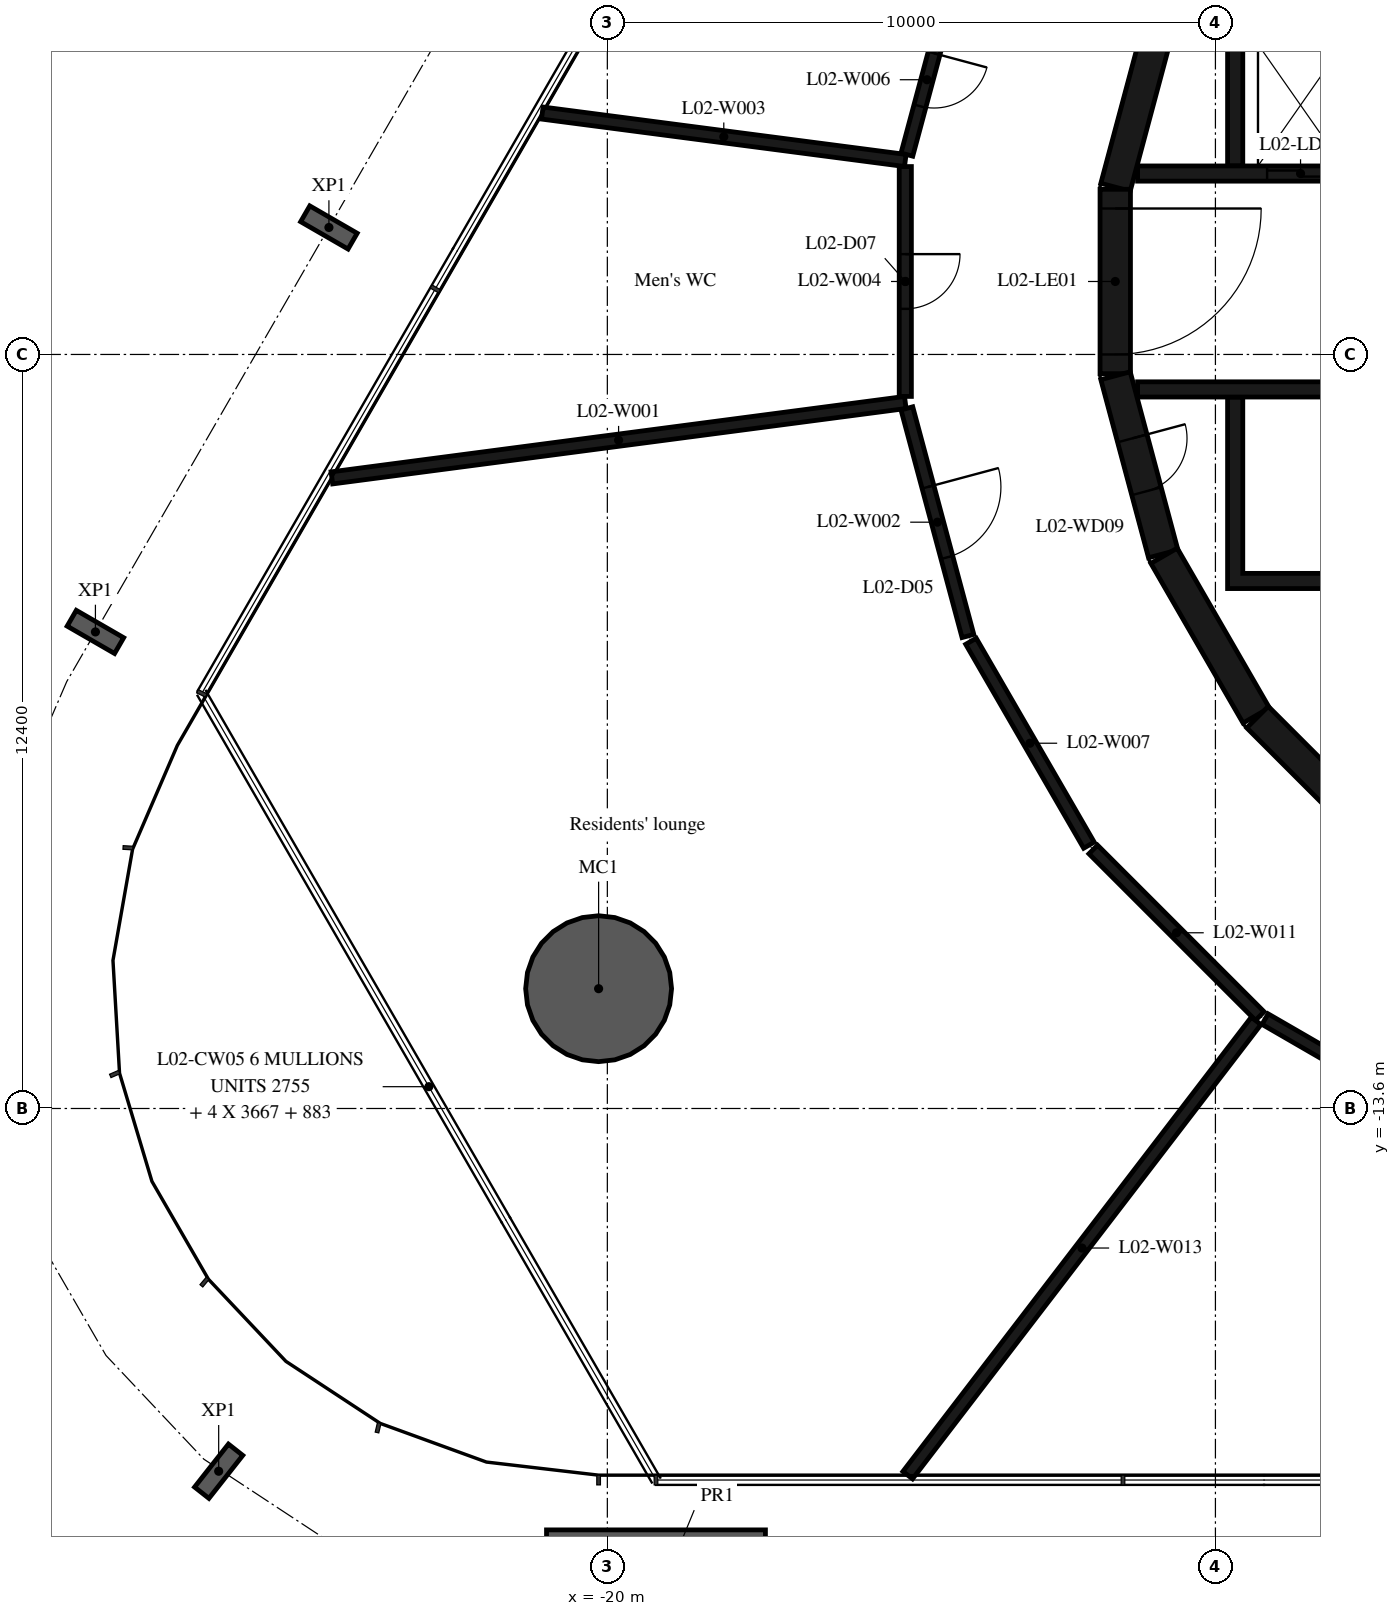
"""IFC4 building model, lengths in metres.
Left out: names, types, materials, properties, quantities, classifications, styles, units other than length and angle.
Written with IfcOpenShell. Run it as: python <this file> out.ifc"""

import sys

from ifc_helpers import new_model, si_unit, direction, frame, frame_2d, origin, origin_2d, place, context, subcontext, project, spatial, polyline, rectangle, hollow_circle, i_section, outline, extrude, element, fill, save


model = new_model("IFC4")
c1 = context("Model", 3, precision=1e-05, world=origin(), true_north=direction((0.0, 1.0)))
c2 = subcontext(c1, "Body", "Model", "MODEL_VIEW")
j1 = project(units=[si_unit("LENGTHUNIT", "METRE"), si_unit("PLANEANGLEUNIT", "RADIAN")], contexts=[c1])
p1 = place(None, origin())
s1 = spatial("IfcSite", under=j1, at=p1, CompositionType="ELEMENT")
p2 = place(p1, origin())
s2 = spatial("IfcBuilding", under=s1, at=p2, CompositionType="ELEMENT")
p3 = place(p2, frame((0.0, 0.0, 13.8)))
s3 = spatial("IfcBuildingStorey", under=s2, at=p3, CompositionType="ELEMENT", Elevation=13.8)
p4 = place(p3, frame((-20.144, -11.63, -0.38), z_axis=(0.0, 0.0, 1.0), x_axis=(1.0, 0.0, 0.0)))
e1 = element("IfcColumn", 1, at=p4, inside=s3, PredefinedType="COLUMN", context=c2, shape_type="SweptSolid", body=[
    extrude(hollow_circle(Radius=1.2, WallThickness=0.06, at=origin_2d()), origin(), (0.0, 0.0, 1.0), 4.8),
])
for number, where, z_axis, x_axis in (
    (2, (-24.579, 0.888, -0.38), (0.0, 0.0, 1.0), (0.5, 0.866, 0.0)),
    (3, (-28.419, -5.763, -0.38), (0.0, 0.0, 1.0), (0.5, 0.866, 0.0)),
    (4, (-26.392, -19.565, -0.38), (0.0, 0.0, 1.0), (-0.786, 0.619, 0.0)),
):
    element("IfcColumn", number, at=place(p3, frame(where, z_axis=z_axis, x_axis=x_axis)), inside=s3, PredefinedType="COLUMN", context=c2, shape_type="SweptSolid", body=[
        extrude(i_section(OverallWidth=0.3, OverallDepth=0.9, WebThickness=0.019, FlangeThickness=0.035, FilletRadius=0.03, at=origin_2d()), origin(), (0.0, 0.0, 1.0), 4.8),
    ])
p5 = place(p3, frame((-19.2, -21.73, -0.38), z_axis=(0.0, 0.0, 1.0), x_axis=(1.0, 0.0, 0.0)))
e5 = element("IfcColumn", 5, at=p5, inside=s3, PredefinedType="COLUMN", context=c2, shape_type="SweptSolid", body=[
    extrude(rectangle(XDim=3.6, YDim=2.4, at=origin_2d()), origin(), (0.0, 0.0, 1.0), 4.8),
])
p6 = place(p3, frame((-10.858, 4.479, 0.0), z_axis=(0.0, 0.0, 1.0), x_axis=(-0.258734743916, -0.965948410781, 0.0)))
e6 = element("IfcWall", 6, at=p6, inside=s3, PredefinedType="SHEAR", context=c2, shape_type="SweptSolid", body=[
    extrude(rectangle(XDim=3.033, YDim=0.5, at=frame_2d((1.516, 0.0))), origin(), (0.0, 0.0, 1.0), 4.42),
])
p7 = place(p3, frame((-11.647, 1.516, 0.0), z_axis=(0.0, 0.0, 1.0), x_axis=(0.0, -1.0, 0.0)))
e7 = element("IfcWall", 7, at=p7, inside=s3, PredefinedType="SHEAR", context=c2, shape_type="SweptSolid", body=[
    extrude(rectangle(XDim=3.033, YDim=0.5, at=frame_2d((1.516, 0.0))), origin(), (0.0, 0.0, 1.0), 4.42),
])
p8 = place(p7, frame((0.316, 0.0, 0.0)))
e8 = element("IfcOpeningElement", 8, at=p8, cuts=e7, PredefinedType="OPENING", context=c2, shape_type="SweptSolid", body=[
    extrude(rectangle(XDim=2.4, YDim=2.1, at=frame_2d((1.2, 1.05))), frame((0.0, 0.26, 0.0), z_axis=(0.0, -1.0, 0.0), x_axis=(1.0, 0.0, 0.0)), (0.0, 0.0, 1.0), 0.52),
])
p9 = place(p3, frame((-11.643, -1.55, 0.0), z_axis=(0.0, 0.0, 1.0), x_axis=(0.258734743916, -0.965948410781, 0.0)))
e9 = element("IfcWall", 9, at=p9, inside=s3, PredefinedType="SHEAR", context=c2, shape_type="SweptSolid", body=[
    extrude(rectangle(XDim=3.033, YDim=0.5, at=frame_2d((1.516, 0.0))), origin(), (0.0, 0.0, 1.0), 4.42),
])
p10 = place(p9, frame((1.066, 0.0, 0.0)))
e10 = element("IfcOpeningElement", 10, at=p10, cuts=e9, PredefinedType="OPENING", context=c2, shape_type="SweptSolid", body=[
    extrude(rectangle(XDim=0.9, YDim=2.1, at=frame_2d((0.45, 1.05))), frame((0.0, 0.26, 0.0), z_axis=(0.0, -1.0, 0.0), x_axis=(1.0, 0.0, 0.0)), (0.0, 0.0, 1.0), 0.52),
])
p11 = place(p3, frame((-10.845, -4.51, 0.0), z_axis=(0.0, 0.0, 1.0), x_axis=(0.500087131594, -0.865975092491, 0.0)))
e11 = element("IfcWall", 11, at=p11, inside=s3, PredefinedType="SHEAR", context=c2, shape_type="SweptSolid", body=[
    extrude(rectangle(XDim=3.033, YDim=0.5, at=frame_2d((1.516, 0.0))), origin(), (0.0, 0.0, 1.0), 4.42),
])
p12 = place(p3, frame((-9.308, -7.164, 0.0), z_axis=(0.0, 0.0, 1.0), x_axis=(0.707106781187, -0.707106781187, 0.0)))
e12 = element("IfcWall", 12, at=p12, inside=s3, PredefinedType="SHEAR", context=c2, shape_type="SweptSolid", body=[
    extrude(rectangle(XDim=3.032, YDim=0.5, at=frame_2d((1.516, 0.0))), origin(), (0.0, 0.0, 1.0), 4.42),
])
p13 = place(p3, origin())
e13 = element("IfcWall", 13, at=p13, inside=s3, PredefinedType="SHEAR", context=c2, shape_type="SweptSolid", body=[
    extrude(outline(polyline([(-9.55, 4.8), (-7.65, 4.8), (-7.65, 1.9), (-7.4, 1.9), (-7.4, 4.8), (-5.5, 4.8), (-5.5, 1.9), (-5.25, 1.9), (-5.25, 4.8), (-3.35, 4.8), (-3.35, 1.9), (-3.1, 1.9), (-3.1, 4.8), (-1.2, 4.8), (-1.2, 1.9), (-0.95, 1.9), (-0.95, 4.8), (0.95, 4.8), (0.95, 1.9), (1.2, 1.9), (1.2, 4.8), (3.1, 4.8), (3.1, 1.9), (3.35, 1.9), (3.35, 4.8), (5.25, 4.8), (5.25, 1.9), (5.5, 1.9), (5.5, 4.8), (7.4, 4.8), (7.4, 1.9), (7.65, 1.9), (7.65, 4.8), (9.55, 4.8), (9.55, 1.9), (9.8, 1.9), (9.8, 4.8), (9.8, 5.05), (-9.8, 5.05), (-9.8, 4.8), (-9.8, 1.9), (-9.55, 1.9), (-9.55, 4.8)])), origin(), (0.0, 0.0, 1.0), 4.42),
])
p14 = place(p3, origin())
e14 = element("IfcWall", 14, at=p14, inside=s3, PredefinedType="SHEAR", context=c2, shape_type="SweptSolid", body=[
    extrude(outline(polyline([(9.8, -5.05), (9.8, -4.8), (9.8, -1.9), (9.55, -1.9), (9.55, -4.8), (7.65, -4.8), (7.65, -1.9), (7.4, -1.9), (7.4, -4.8), (5.5, -4.8), (5.5, -1.9), (5.25, -1.9), (5.25, -4.8), (3.35, -4.8), (3.35, -1.9), (3.1, -1.9), (3.1, -4.8), (-5.25, -4.8), (-5.25, -1.9), (-5.5, -1.9), (-5.5, -4.8), (-7.4, -4.8), (-7.4, -1.9), (-7.65, -1.9), (-7.65, -4.8), (-9.55, -4.8), (-9.55, -1.9), (-9.8, -1.9), (-9.8, -4.8), (-9.8, -5.05), (9.8, -5.05)])), origin(), (0.0, 0.0, 1.0), 4.42),
])
p15 = place(p3, frame((-11.28, 1.775, 0.0), z_axis=(0.0, 0.0, 1.0), x_axis=(1.0, 0.0, 0.0)))
e15 = element("IfcWall", 15, at=p15, inside=s3, PredefinedType="SHEAR", context=c2, shape_type="SweptSolid", body=[
    extrude(rectangle(XDim=14.38, YDim=0.25, at=frame_2d((7.19, 0.0))), origin(), (0.0, 0.0, 1.0), 4.42),
])
p16 = place(p15, frame((2.13, 0.0, 0.0)))
e16 = element("IfcOpeningElement", 16, at=p16, cuts=e15, PredefinedType="OPENING", context=c2, shape_type="SweptSolid", body=[
    extrude(rectangle(XDim=1.1, YDim=2.1, at=frame_2d((0.55, 1.05))), frame((0.0, 0.135, 0.0), z_axis=(0.0, -1.0, 0.0), x_axis=(1.0, 0.0, 0.0)), (0.0, 0.0, 1.0), 0.27),
])
p17 = place(p15, frame((4.28, 0.0, 0.0)))
e17 = element("IfcOpeningElement", 17, at=p17, cuts=e15, PredefinedType="OPENING", context=c2, shape_type="SweptSolid", body=[
    extrude(rectangle(XDim=1.1, YDim=2.1, at=frame_2d((0.55, 1.05))), frame((0.0, 0.135, 0.0), z_axis=(0.0, -1.0, 0.0), x_axis=(1.0, 0.0, 0.0)), (0.0, 0.0, 1.0), 0.27),
])
p18 = place(p15, frame((6.43, 0.0, 0.0)))
e18 = element("IfcOpeningElement", 18, at=p18, cuts=e15, PredefinedType="OPENING", context=c2, shape_type="SweptSolid", body=[
    extrude(rectangle(XDim=1.1, YDim=2.1, at=frame_2d((0.55, 1.05))), frame((0.0, 0.135, 0.0), z_axis=(0.0, -1.0, 0.0), x_axis=(1.0, 0.0, 0.0)), (0.0, 0.0, 1.0), 0.27),
])
p19 = place(p15, frame((8.58, 0.0, 0.0)))
e19 = element("IfcOpeningElement", 19, at=p19, cuts=e15, PredefinedType="OPENING", context=c2, shape_type="SweptSolid", body=[
    extrude(rectangle(XDim=1.1, YDim=2.1, at=frame_2d((0.55, 1.05))), frame((0.0, 0.135, 0.0), z_axis=(0.0, -1.0, 0.0), x_axis=(1.0, 0.0, 0.0)), (0.0, 0.0, 1.0), 0.27),
])
p20 = place(p15, frame((10.83, 0.0, 0.0)))
e20 = element("IfcOpeningElement", 20, at=p20, cuts=e15, PredefinedType="OPENING", context=c2, shape_type="SweptSolid", body=[
    extrude(rectangle(XDim=0.9, YDim=2.1, at=frame_2d((0.45, 1.05))), frame((0.0, 0.135, 0.0), z_axis=(0.0, -1.0, 0.0), x_axis=(1.0, 0.0, 0.0)), (0.0, 0.0, 1.0), 0.27),
])
p21 = place(p15, frame((12.98, 0.0, 0.0)))
e21 = element("IfcOpeningElement", 21, at=p21, cuts=e15, PredefinedType="OPENING", context=c2, shape_type="SweptSolid", body=[
    extrude(rectangle(XDim=0.9, YDim=2.1, at=frame_2d((0.45, 1.05))), frame((0.0, 0.135, 0.0), z_axis=(0.0, -1.0, 0.0), x_axis=(1.0, 0.0, 0.0)), (0.0, 0.0, 1.0), 0.27),
])
p22 = place(p3, frame((-11.28, -1.775, 0.0), z_axis=(0.0, 0.0, 1.0), x_axis=(1.0, 0.0, 0.0)))
e22 = element("IfcWall", 22, at=p22, inside=s3, PredefinedType="SHEAR", context=c2, shape_type="SweptSolid", body=[
    extrude(rectangle(XDim=14.38, YDim=0.25, at=frame_2d((7.19, 0.0))), origin(), (0.0, 0.0, 1.0), 4.42),
])
p23 = place(p22, frame((9.755, 0.0, 0.0)))
e23 = element("IfcOpeningElement", 23, at=p23, cuts=e22, PredefinedType="OPENING", context=c2, shape_type="SweptSolid", body=[
    extrude(rectangle(XDim=0.9, YDim=2.1, at=frame_2d((0.45, 1.05))), frame((0.0, 0.135, 0.0), z_axis=(0.0, -1.0, 0.0), x_axis=(1.0, 0.0, 0.0)), (0.0, 0.0, 1.0), 0.27),
])
p24 = place(p3, frame((-15.1, -1.99, 0.0), z_axis=(0.0, 0.0, 1.0), x_axis=(-0.99146503856, -0.130372839634, 0.0)))
e24 = element("IfcWall", 24, at=p24, inside=s3, PredefinedType="PARTITIONING", context=c2, shape_type="SweptSolid", body=[
    extrude(rectangle(XDim=9.511, YDim=0.2, at=frame_2d((4.756, 0.0))), origin(), (0.0, 0.0, 1.0), 4.42),
])
p25 = place(p3, frame((-15.074, -2.087, 0.0), z_axis=(0.0, 0.0, 1.0), x_axis=(0.259026804199, -0.965870133458, 0.0)))
e25 = element("IfcWall", 25, at=p25, inside=s3, PredefinedType="PARTITIONING", context=c2, shape_type="SweptSolid", body=[
    extrude(rectangle(XDim=3.876, YDim=0.2, at=frame_2d((1.938, 0.0))), origin(), (0.0, 0.0, 1.0), 4.42),
])
p26 = place(p25, frame((1.338, 0.0, 0.0)))
e26 = element("IfcOpeningElement", 26, at=p26, cuts=e25, PredefinedType="OPENING", context=c2, shape_type="SweptSolid", body=[
    extrude(rectangle(XDim=1.2, YDim=2.1, at=frame_2d((0.6, 1.05))), frame((0.0, 0.11, 0.0), z_axis=(0.0, -1.0, 0.0), x_axis=(1.0, 0.0, 0.0)), (0.0, 0.0, 1.0), 0.22),
])
p27 = place(p3, frame((-15.1, 1.99, 0.0), z_axis=(0.0, 0.0, 1.0), x_axis=(-0.991571896529, 0.129557608858, 0.0)))
e27 = element("IfcWall", 27, at=p27, inside=s3, PredefinedType="PARTITIONING", context=c2, shape_type="SweptSolid", body=[
    extrude(rectangle(XDim=6.021, YDim=0.2, at=frame_2d((3.01, 0.0))), origin(), (0.0, 0.0, 1.0), 4.42),
])
p28 = place(p3, frame((-15.1, 1.89, 0.0), z_axis=(0.0, 0.0, 1.0), x_axis=(0.0, -1.0, 0.0)))
e28 = element("IfcWall", 28, at=p28, inside=s3, PredefinedType="PARTITIONING", context=c2, shape_type="SweptSolid", body=[
    extrude(rectangle(XDim=3.78, YDim=0.2, at=frame_2d((1.89, 0.0))), origin(), (0.0, 0.0, 1.0), 4.42),
])
p29 = place(p28, frame((1.44, 0.0, 0.0)))
e29 = element("IfcOpeningElement", 29, at=p29, cuts=e28, PredefinedType="OPENING", context=c2, shape_type="SweptSolid", body=[
    extrude(rectangle(XDim=0.9, YDim=2.1, at=frame_2d((0.45, 1.05))), frame((0.0, 0.11, 0.0), z_axis=(0.0, -1.0, 0.0), x_axis=(1.0, 0.0, 0.0)), (0.0, 0.0, 1.0), 0.22),
])
p30 = place(p3, frame((-14.412, 4.549, 0.0), z_axis=(0.0, 0.0, 1.0), x_axis=(-0.25946184252, -0.965753359961, 0.0)))
e30 = element("IfcWall", 30, at=p30, inside=s3, PredefinedType="PARTITIONING", context=c2, shape_type="SweptSolid", body=[
    extrude(rectangle(XDim=2.55, YDim=0.2, at=frame_2d((1.275, 0.0))), origin(), (0.0, 0.0, 1.0), 4.42),
])
p31 = place(p30, frame((0.825, 0.0, 0.0)))
e31 = element("IfcOpeningElement", 31, at=p31, cuts=e30, PredefinedType="OPENING", context=c2, shape_type="SweptSolid", body=[
    extrude(rectangle(XDim=0.9, YDim=2.1, at=frame_2d((0.45, 1.05))), frame((0.0, 0.11, 0.0), z_axis=(0.0, -1.0, 0.0), x_axis=(1.0, 0.0, 0.0)), (0.0, 0.0, 1.0), 0.22),
])
p32 = place(p3, frame((-14.02, -5.917, 0.0), z_axis=(0.0, 0.0, 1.0), x_axis=(0.500733182901, -0.865601686425, 0.0)))
e32 = element("IfcWall", 32, at=p32, inside=s3, PredefinedType="PARTITIONING", context=c2, shape_type="SweptSolid", body=[
    extrude(rectangle(XDim=3.874, YDim=0.2, at=frame_2d((1.937, 0.0))), origin(), (0.0, 0.0, 1.0), 4.42),
])
p33 = place(p3, frame((-12.009, -9.341, 0.0), z_axis=(0.0, 0.0, 1.0), x_axis=(0.707106781187, -0.707106781187, 0.0)))
e33 = element("IfcWall", 33, at=p33, inside=s3, PredefinedType="PARTITIONING", context=c2, shape_type="SweptSolid", body=[
    extrude(rectangle(XDim=3.874, YDim=0.2, at=frame_2d((1.937, 0.0))), origin(), (0.0, 0.0, 1.0), 4.42),
])
p34 = place(p3, frame((-9.331, -12.159, 0.0), z_axis=(0.0, 0.0, 1.0), x_axis=(-0.608558385637, -0.793509099677, 0.0)))
e34 = element("IfcWall", 34, at=p34, inside=s3, PredefinedType="PARTITIONING", context=c2, shape_type="SweptSolid", body=[
    extrude(rectangle(XDim=9.415, YDim=0.2, at=frame_2d((4.707, 0.0))), origin(), (0.0, 0.0, 1.0), 4.42),
])
p35 = place(p3, frame((-9.183, -12.13, 0.0), z_axis=(0.0, 0.0, 1.0), x_axis=(0.865585884642, -0.500760497952, 0.0)))
e35 = element("IfcWall", 35, at=p35, inside=s3, PredefinedType="PARTITIONING", context=c2, shape_type="SweptSolid", body=[
    extrude(rectangle(XDim=3.874, YDim=0.2, at=frame_2d((1.937, 0.0))), origin(), (0.0, 0.0, 1.0), 4.42),
])
p36 = place(p8, origin())
e36 = element("IfcDoor", 36, at=p36, inside=s3, OperationType="DOUBLE_DOOR_SINGLE_SWING", PredefinedType="DOOR", context=c2, shape_type="SweptSolid", body=[
    extrude(rectangle(XDim=2.4, YDim=2.1, at=frame_2d((1.2, 1.05))), frame((0.0, 0.025, 0.0), z_axis=(0.0, -1.0, 0.0), x_axis=(1.0, 0.0, 0.0)), (0.0, 0.0, 1.0), 0.05),
])
fill(e8, e36)
p37 = place(p16, origin())
e37 = element("IfcDoor", 37, at=p37, inside=s3, OperationType="DOUBLE_DOOR_SLIDING", PredefinedType="DOOR", context=c2, shape_type="SweptSolid", body=[
    extrude(rectangle(XDim=1.1, YDim=2.1, at=frame_2d((0.55, 1.05))), frame((0.0, 0.025, 0.0), z_axis=(0.0, -1.0, 0.0), x_axis=(1.0, 0.0, 0.0)), (0.0, 0.0, 1.0), 0.05),
])
fill(e16, e37)
p38 = place(p10, origin())
e38 = element("IfcDoor", 38, at=p38, inside=s3, OperationType="SINGLE_SWING_RIGHT", PredefinedType="DOOR", context=c2, shape_type="SweptSolid", body=[
    extrude(rectangle(XDim=0.9, YDim=2.1, at=frame_2d((0.45, 1.05))), frame((0.0, 0.025, 0.0), z_axis=(0.0, -1.0, 0.0), x_axis=(1.0, 0.0, 0.0)), (0.0, 0.0, 1.0), 0.05),
])
fill(e10, e38)
p39 = place(p26, origin())
e39 = element("IfcDoor", 39, at=p39, inside=s3, OperationType="SINGLE_SWING_LEFT", PredefinedType="DOOR", context=c2, shape_type="SweptSolid", body=[
    extrude(rectangle(XDim=1.2, YDim=2.1, at=frame_2d((0.6, 1.05))), frame((0.0, 0.025, 0.0), z_axis=(0.0, -1.0, 0.0), x_axis=(1.0, 0.0, 0.0)), (0.0, 0.0, 1.0), 0.05),
])
fill(e26, e39)
p40 = place(p29, origin())
e40 = element("IfcDoor", 40, at=p40, inside=s3, OperationType="SINGLE_SWING_LEFT", PredefinedType="DOOR", context=c2, shape_type="SweptSolid", body=[
    extrude(rectangle(XDim=0.9, YDim=2.1, at=frame_2d((0.45, 1.05))), frame((0.0, 0.025, 0.0), z_axis=(0.0, -1.0, 0.0), x_axis=(1.0, 0.0, 0.0)), (0.0, 0.0, 1.0), 0.05),
])
fill(e29, e40)
p41 = place(p31, origin())
e41 = element("IfcDoor", 41, at=p41, inside=s3, OperationType="SINGLE_SWING_LEFT", PredefinedType="DOOR", context=c2, shape_type="SweptSolid", body=[
    extrude(rectangle(XDim=0.9, YDim=2.1, at=frame_2d((0.45, 1.05))), frame((0.0, 0.025, 0.0), z_axis=(0.0, -1.0, 0.0), x_axis=(1.0, 0.0, 0.0)), (0.0, 0.0, 1.0), 0.05),
])
fill(e31, e41)
save(model, sys.argv[1])
